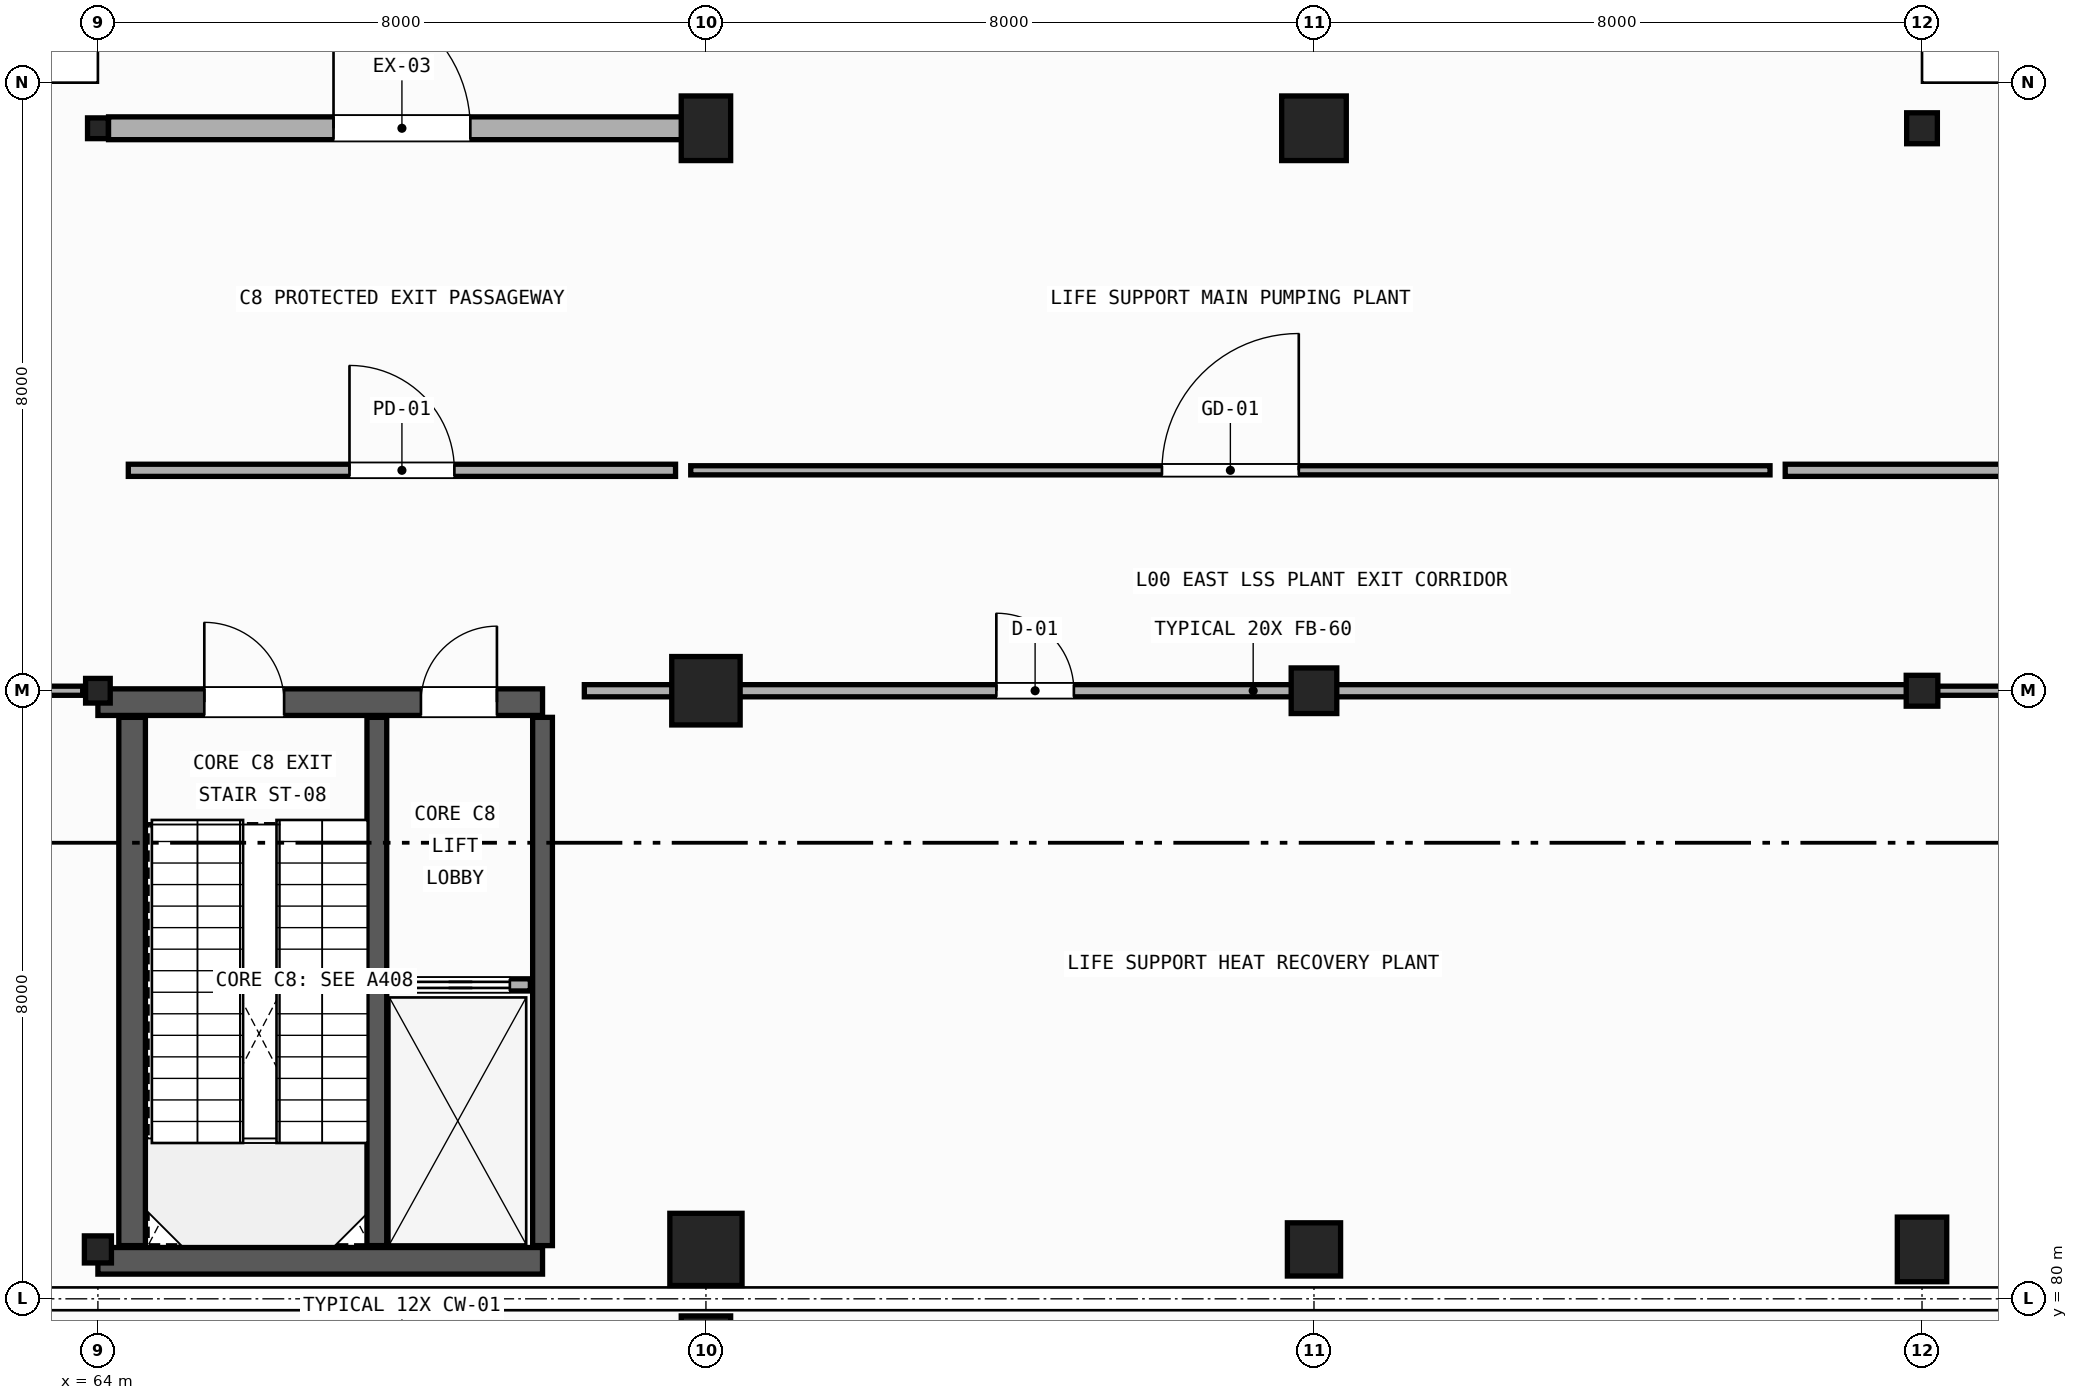
"""IFC4 building model, lengths in metres.
Left out: names, types, materials, properties, quantities, classifications, styles, units other than length and angle.
Written with IfcOpenShell. Run it as: python <this file> out.ifc"""

import sys

from ifc_helpers import new_model, si_unit, direction, frame, frame_2d, origin, origin_2d, place, context, subcontext, project, spatial, rectangle, circle, hollow_circle, i_section, extrude, element, fill, save


model = new_model("IFC4")
c1 = context("Model", 3, precision=1e-05, world=origin(), true_north=direction((0.0, 1.0)))
c2 = subcontext(c1, "Body", "Model", "MODEL_VIEW")
j1 = project(units=[si_unit("LENGTHUNIT", "METRE"), si_unit("PLANEANGLEUNIT", "RADIAN")], contexts=[c1])
p1 = place(None, origin())
s1 = spatial("IfcSite", under=j1, at=p1, CompositionType="ELEMENT")
p2 = place(p1, origin())
s2 = spatial("IfcBuilding", under=s1, at=p2, CompositionType="ELEMENT")
p3 = place(p2, origin())
s3 = spatial("IfcBuildingStorey", under=s2, at=p3, CompositionType="ELEMENT", Elevation=0.0)
p4 = place(p3, frame((72.0, 79.35, 0.0), z_axis=(0.0, 0.0, 1.0), x_axis=(1.0, 0.0, 0.0)))
e1 = element("IfcColumn", 1, at=p4, inside=s3, PredefinedType="PILASTER", context=c2, shape_type="SweptSolid", body=[
    extrude(rectangle(XDim=0.65, YDim=0.85, at=origin_2d()), origin(), (0.0, 0.0, 1.0), 5.08),
])
p5 = place(p3, frame((64.0, 80.65, 0.0), z_axis=(0.0, 0.0, 1.0), x_axis=(0.0, 1.0, 0.0)))
e2 = element("IfcColumn", 2, at=p5, inside=s3, PredefinedType="COLUMN", context=c2, shape_type="SweptSolid", body=[
    extrude(hollow_circle(Radius=0.178, WallThickness=0.012, at=origin_2d()), origin(), (0.0, 0.0, 1.0), 5.08),
])
p6 = place(p3, frame((64.0, 88.0, 0.0), z_axis=(0.0, 0.0, 1.0), x_axis=(1.0, 0.0, 0.0)))
e3 = element("IfcColumn", 3, at=p6, inside=s3, PredefinedType="COLUMN", context=c2, shape_type="SweptSolid", body=[
    extrude(hollow_circle(Radius=0.162, WallThickness=0.012, at=origin_2d()), origin(), (0.0, 0.0, 1.0), 5.08),
])
p7 = place(p3, frame((64.0, 95.4, 0.0), z_axis=(0.0, 0.0, 1.0), x_axis=(0.0, 1.0, 0.0)))
e4 = element("IfcColumn", 4, at=p7, inside=s3, PredefinedType="COLUMN", context=c2, shape_type="SweptSolid", body=[
    extrude(hollow_circle(Radius=0.136, WallThickness=0.012, at=origin_2d()), origin(), (0.0, 0.0, 1.0), 5.08),
])
p8 = place(p3, frame((72.0, 80.65, 0.0), z_axis=(0.0, 0.0, 1.0), x_axis=(1.0, 0.0, 0.0)))
e5 = element("IfcColumn", 5, at=p8, inside=s3, PredefinedType="COLUMN", context=c2, shape_type="SweptSolid", body=[
    extrude(rectangle(XDim=0.95, YDim=0.95, at=origin_2d()), origin(), (0.0, 0.0, 1.0), 5.08),
])
p9 = place(p3, frame((72.0, 88.0, 0.0), z_axis=(0.0, 0.0, 1.0), x_axis=(0.0, 1.0, 0.0)))
e6 = element("IfcColumn", 6, at=p9, inside=s3, PredefinedType="COLUMN", context=c2, shape_type="SweptSolid", body=[
    extrude(rectangle(XDim=0.9, YDim=0.9, at=origin_2d()), origin(), (0.0, 0.0, 1.0), 5.08),
])
p10 = place(p3, frame((72.0, 95.4, 0.0), z_axis=(0.0, 0.0, 1.0), x_axis=(1.0, 0.0, 0.0)))
e7 = element("IfcColumn", 7, at=p10, inside=s3, PredefinedType="PILASTER", context=c2, shape_type="SweptSolid", body=[
    extrude(rectangle(XDim=0.65, YDim=0.85, at=origin_2d()), origin(), (0.0, 0.0, 1.0), 5.08),
])
p11 = place(p3, frame((80.0, 80.65, 0.0), z_axis=(0.0, 0.0, 1.0), x_axis=(0.0, 1.0, 0.0)))
e8 = element("IfcColumn", 8, at=p11, inside=s3, PredefinedType="COLUMN", context=c2, shape_type="SweptSolid", body=[
    extrude(rectangle(XDim=0.7, YDim=0.7, at=origin_2d()), origin(), (0.0, 0.0, 1.0), 5.08),
])
p12 = place(p3, frame((80.0, 88.0, 0.0), z_axis=(0.0, 0.0, 1.0), x_axis=(1.0, 0.0, 0.0)))
e9 = element("IfcColumn", 9, at=p12, inside=s3, PredefinedType="COLUMN", context=c2, shape_type="SweptSolid", body=[
    extrude(rectangle(XDim=0.6, YDim=0.6, at=origin_2d()), origin(), (0.0, 0.0, 1.0), 5.08),
])
p13 = place(p3, frame((80.0, 95.4, 0.0), z_axis=(0.0, 0.0, 1.0), x_axis=(0.0, 1.0, 0.0)))
e10 = element("IfcColumn", 10, at=p13, inside=s3, PredefinedType="COLUMN", context=c2, shape_type="SweptSolid", body=[
    extrude(circle(Radius=0.425, at=origin_2d()), origin(), (0.0, 0.0, 1.0), 5.08),
])
p14 = place(p3, frame((88.0, 80.65, 0.0), z_axis=(0.0, 0.0, 1.0), x_axis=(1.0, 0.0, 0.0)))
e11 = element("IfcColumn", 11, at=p14, inside=s3, PredefinedType="PILASTER", context=c2, shape_type="SweptSolid", body=[
    extrude(rectangle(XDim=0.65, YDim=0.85, at=origin_2d()), origin(), (0.0, 0.0, 1.0), 5.08),
])
p15 = place(p3, frame((88.0, 88.0, 0.0), z_axis=(0.0, 0.0, 1.0), x_axis=(0.0, 1.0, 0.0)))
e12 = element("IfcColumn", 12, at=p15, inside=s3, PredefinedType="COLUMN", context=c2, shape_type="SweptSolid", body=[
    extrude(i_section(OverallWidth=0.406, OverallDepth=0.416, WebThickness=0.03, FlangeThickness=0.048, FilletRadius=0.015, at=origin_2d()), origin(), (0.0, 0.0, 1.0), 5.08),
])
p16 = place(p3, frame((88.0, 95.4, 0.0), z_axis=(0.0, 0.0, 1.0), x_axis=(1.0, 0.0, 0.0)))
e13 = element("IfcColumn", 13, at=p16, inside=s3, PredefinedType="COLUMN", context=c2, shape_type="SweptSolid", body=[
    extrude(i_section(OverallWidth=0.404, OverallDepth=0.407, WebThickness=0.027, FlangeThickness=0.044, FilletRadius=0.015, at=origin_2d()), origin(), (0.0, 0.0, 1.0), 5.08),
])
p17 = place(p3, frame((64.14, 95.4, 0.0), z_axis=(0.0, 0.0, 1.0), x_axis=(1.0, 0.0, 0.0)))
e14 = element("IfcWall", 14, at=p17, inside=s3, PredefinedType="STANDARD", context=c2, shape_type="SweptSolid", body=[
    extrude(rectangle(XDim=7.72, YDim=0.3, at=frame_2d((3.86, 0.0))), origin(), (0.0, 0.0, 1.0), 4.24),
])
p18 = place(p17, frame((2.96, 0.0, 0.0)))
e15 = element("IfcOpeningElement", 15, at=p18, cuts=e14, PredefinedType="OPENING", context=c2, shape_type="SweptSolid", body=[
    extrude(rectangle(XDim=1.8, YDim=2.35, at=frame_2d((0.9, 1.175))), frame((0.0, 0.16, 0.0), z_axis=(0.0, -1.0, 0.0), x_axis=(1.0, 0.0, 0.0)), (0.0, 0.0, 1.0), 0.32),
])
p19 = place(p3, frame((64.0, 87.85, 0.0), z_axis=(0.0, 0.0, 1.0), x_axis=(1.0, 0.0, 0.0)))
e16 = element("IfcWall", 16, at=p19, inside=s3, PredefinedType="SHEAR", context=c2, shape_type="SweptSolid", body=[
    extrude(rectangle(XDim=5.85, YDim=0.35, at=frame_2d((2.925, 0.0))), origin(), (0.0, 0.0, 1.0), 5.07),
])
p20 = place(p19, frame((1.4, 0.0, 0.0)))
e17 = element("IfcOpeningElement", 17, at=p20, cuts=e16, PredefinedType="OPENING", context=c2, shape_type="SweptSolid", body=[
    extrude(rectangle(XDim=1.05, YDim=2.1, at=frame_2d((0.525, 1.05))), frame((0.0, 0.185, 0.0), z_axis=(0.0, -1.0, 0.0), x_axis=(1.0, 0.0, 0.0)), (0.0, 0.0, 1.0), 0.37),
])
p21 = place(p19, frame((4.25, 0.0, 0.0)))
e18 = element("IfcOpeningElement", 18, at=p21, cuts=e16, PredefinedType="OPENING", context=c2, shape_type="SweptSolid", body=[
    extrude(rectangle(XDim=1.0, YDim=2.15, at=frame_2d((0.5, 1.075))), frame((0.0, 0.185, 0.0), z_axis=(0.0, -1.0, 0.0), x_axis=(1.0, 0.0, 0.0)), (0.0, 0.0, 1.0), 0.37),
])
p22 = place(p3, frame((64.0, 80.5, 0.0), z_axis=(0.0, 0.0, 1.0), x_axis=(1.0, 0.0, 0.0)))
e19 = element("IfcWall", 19, at=p22, inside=s3, PredefinedType="SHEAR", context=c2, shape_type="SweptSolid", body=[
    extrude(rectangle(XDim=5.85, YDim=0.35, at=frame_2d((2.925, 0.0))), origin(), (0.0, 0.0, 1.0), 5.07),
])
p23 = place(p3, frame((64.45, 80.7, 0.0), z_axis=(0.0, 0.0, 1.0), x_axis=(0.0, 1.0, 0.0)))
e20 = element("IfcWall", 20, at=p23, inside=s3, PredefinedType="SHEAR", context=c2, shape_type="SweptSolid", body=[
    extrude(rectangle(XDim=6.95, YDim=0.35, at=frame_2d((3.475, 0.0))), origin(), (0.0, 0.0, 1.0), 5.07),
])
for number, where, z_axis, x_axis in (
    (21, (69.85, 80.7, 0.0), (0.0, 0.0, 1.0), (0.0, 1.0, 0.0)),
    (22, (67.67, 80.7, 0.0), (0.0, 0.0, 1.0), (0.0, 1.0, 0.0)),
):
    element("IfcWall", number, at=place(p3, frame(where, z_axis=z_axis, x_axis=x_axis)), inside=s3, PredefinedType="SHEAR", context=c2, shape_type="SweptSolid", body=[
        extrude(rectangle(XDim=6.95, YDim=0.26, at=frame_2d((3.475, 0.0))), origin(), (0.0, 0.0, 1.0), 5.07),
    ])
p24 = place(p3, frame((67.85, 84.13, 0.0), z_axis=(0.0, 0.0, 1.0), x_axis=(1.0, 0.0, 0.0)))
e23 = element("IfcWall", 23, at=p24, inside=s3, PredefinedType="PARTITIONING", context=c2, shape_type="SweptSolid", body=[
    extrude(rectangle(XDim=1.84, YDim=0.16, at=frame_2d((0.92, 0.0))), origin(), (0.0, 0.0, 1.0), 3.6),
])
p25 = place(p24, frame((0.27, 0.0, 0.0)))
e24 = element("IfcOpeningElement", 24, at=p25, cuts=e23, PredefinedType="OPENING", context=c2, shape_type="SweptSolid", body=[
    extrude(rectangle(XDim=1.3, YDim=2.2, at=frame_2d((0.65, 1.1))), frame((0.0, 0.09, 0.0), z_axis=(0.0, -1.0, 0.0), x_axis=(1.0, 0.0, 0.0)), (0.0, 0.0, 1.0), 0.18),
])
p26 = place(p3, frame((57.0, 88.0, 0.0), z_axis=(0.0, 0.0, 1.0), x_axis=(1.0, 0.0, 0.0)))
e25 = element("IfcWall", 25, at=p26, inside=s3, PredefinedType="PARTITIONING", context=c2, shape_type="SweptSolid", body=[
    extrude(rectangle(XDim=6.8, YDim=0.12, at=frame_2d((3.4, 0.0))), origin(), (0.0, 0.0, 1.0), 4.29),
])
p27 = place(p26, frame((2.84, 0.0, 0.0)))
e26 = element("IfcOpeningElement", 26, at=p27, cuts=e25, PredefinedType="OPENING", context=c2, shape_type="SweptSolid", body=[
    extrude(rectangle(XDim=1.12, YDim=2.15, at=frame_2d((0.56, 1.075))), frame((0.0, 0.07, 0.0), z_axis=(0.0, -1.0, 0.0), x_axis=(1.0, 0.0, 0.0)), (0.0, 0.0, 1.0), 0.14),
])
p28 = place(p3, frame((70.4, 88.0, 0.0), z_axis=(0.0, 0.0, 1.0), x_axis=(1.0, 0.0, 0.0)))
e27 = element("IfcWall", 27, at=p28, inside=s3, PredefinedType="PARTITIONING", context=c2, shape_type="SweptSolid", body=[
    extrude(rectangle(XDim=17.6, YDim=0.16, at=frame_2d((8.8, 0.0))), origin(), (0.0, 0.0, 1.0), 4.278),
])
p29 = place(p28, frame((5.421, 0.0, 0.0)))
e28 = element("IfcOpeningElement", 28, at=p29, cuts=e27, PredefinedType="OPENING", context=c2, shape_type="SweptSolid", body=[
    extrude(rectangle(XDim=1.02, YDim=2.15, at=frame_2d((0.51, 1.075))), frame((0.0, 0.09, 0.0), z_axis=(0.0, -1.0, 0.0), x_axis=(1.0, 0.0, 0.0)), (0.0, 0.0, 1.0), 0.18),
])
p30 = place(p3, frame((88.2, 88.0, 0.0), z_axis=(0.0, 0.0, 1.0), x_axis=(1.0, 0.0, 0.0)))
e29 = element("IfcWall", 29, at=p30, inside=s3, PredefinedType="PARTITIONING", context=c2, shape_type="SweptSolid", body=[
    extrude(rectangle(XDim=15.0, YDim=0.12, at=frame_2d((7.5, 0.0))), origin(), (0.0, 0.0, 1.0), 4.278),
])
p31 = place(p30, frame((4.608, 0.0, 0.0)))
e30 = element("IfcOpeningElement", 30, at=p31, cuts=e29, PredefinedType="OPENING", context=c2, shape_type="SweptSolid", body=[
    extrude(rectangle(XDim=0.96, YDim=2.1, at=frame_2d((0.48, 1.05))), frame((0.0, 0.07, 0.0), z_axis=(0.0, -1.0, 0.0), x_axis=(1.0, 0.0, 0.0)), (0.0, 0.0, 1.0), 0.14),
])
p32 = place(p3, frame((64.4, 90.9, 0.0), z_axis=(0.0, 0.0, 1.0), x_axis=(1.0, 0.0, 0.0)))
e31 = element("IfcWall", 31, at=p32, inside=s3, PredefinedType="PARTITIONING", context=c2, shape_type="SweptSolid", body=[
    extrude(rectangle(XDim=7.2, YDim=0.16, at=frame_2d((3.6, 0.0))), origin(), (0.0, 0.0, 1.0), 4.29),
])
p33 = place(p32, frame((2.91, 0.0, 0.0)))
e32 = element("IfcOpeningElement", 32, at=p33, cuts=e31, PredefinedType="OPENING", context=c2, shape_type="SweptSolid", body=[
    extrude(rectangle(XDim=1.38, YDim=2.25, at=frame_2d((0.69, 1.125))), frame((0.0, 0.09, 0.0), z_axis=(0.0, -1.0, 0.0), x_axis=(1.0, 0.0, 0.0)), (0.0, 0.0, 1.0), 0.18),
])
p34 = place(p3, frame((71.8, 90.9, 0.0), z_axis=(0.0, 0.0, 1.0), x_axis=(1.0, 0.0, 0.0)))
e33 = element("IfcWall", 33, at=p34, inside=s3, PredefinedType="PARTITIONING", context=c2, shape_type="SweptSolid", body=[
    extrude(rectangle(XDim=14.2, YDim=0.12, at=frame_2d((7.1, 0.0))), origin(), (0.0, 0.0, 1.0), 4.278),
])
p35 = place(p34, frame((6.2, 0.0, 0.0)))
e34 = element("IfcOpeningElement", 34, at=p35, cuts=e33, PredefinedType="OPENING", context=c2, shape_type="SweptSolid", body=[
    extrude(rectangle(XDim=1.8, YDim=2.4, at=frame_2d((0.9, 1.2))), frame((0.0, 0.07, 0.0), z_axis=(0.0, -1.0, 0.0), x_axis=(1.0, 0.0, 0.0)), (0.0, 0.0, 1.0), 0.14),
])
p36 = place(p3, frame((86.2, 90.9, 0.0), z_axis=(0.0, 0.0, 1.0), x_axis=(1.0, 0.0, 0.0)))
e35 = element("IfcWall", 35, at=p36, inside=s3, PredefinedType="PARTITIONING", context=c2, shape_type="SweptSolid", body=[
    extrude(rectangle(XDim=17.0, YDim=0.16, at=frame_2d((8.5, 0.0))), origin(), (0.0, 0.0, 1.0), 4.287),
])
p37 = place(p36, frame((7.675, 0.0, 0.0)))
e36 = element("IfcOpeningElement", 36, at=p37, cuts=e35, PredefinedType="OPENING", context=c2, shape_type="SweptSolid", body=[
    extrude(rectangle(XDim=1.65, YDim=2.35, at=frame_2d((0.825, 1.175))), frame((0.0, 0.09, 0.0), z_axis=(0.0, -1.0, 0.0), x_axis=(1.0, 0.0, 0.0)), (0.0, 0.0, 1.0), 0.18),
])
p38 = place(p18, origin())
e37 = element("IfcDoor", 37, at=p38, inside=s3, OperationType="SINGLE_SWING_LEFT", PredefinedType="DOOR", context=c2, shape_type="SweptSolid", body=[
    extrude(rectangle(XDim=1.8, YDim=2.35, at=frame_2d((0.9, 1.175))), frame((0.0, 0.025, 0.0), z_axis=(0.0, -1.0, 0.0), x_axis=(1.0, 0.0, 0.0)), (0.0, 0.0, 1.0), 0.05),
])
fill(e15, e37)
p39 = place(p25, origin())
e38 = element("IfcDoor", 38, at=p39, inside=s3, OperationType="SLIDING_TO_LEFT", PredefinedType="DOOR", context=c2, shape_type="SweptSolid", body=[
    extrude(rectangle(XDim=1.3, YDim=2.2, at=frame_2d((0.65, 1.1))), frame((0.0, 0.025, 0.0), z_axis=(0.0, -1.0, 0.0), x_axis=(1.0, 0.0, 0.0)), (0.0, 0.0, 1.0), 0.05),
])
fill(e24, e38)
p40 = place(p20, origin())
e39 = element("IfcDoor", 39, at=p40, inside=s3, OperationType="SINGLE_SWING_LEFT", PredefinedType="DOOR", context=c2, shape_type="SweptSolid", body=[
    extrude(rectangle(XDim=1.05, YDim=2.1, at=frame_2d((0.525, 1.05))), frame((0.0, 0.025, 0.0), z_axis=(0.0, -1.0, 0.0), x_axis=(1.0, 0.0, 0.0)), (0.0, 0.0, 1.0), 0.05),
])
fill(e17, e39)
p41 = place(p21, origin())
e40 = element("IfcDoor", 40, at=p41, inside=s3, OperationType="SINGLE_SWING_RIGHT", PredefinedType="DOOR", context=c2, shape_type="SweptSolid", body=[
    extrude(rectangle(XDim=1.0, YDim=2.15, at=frame_2d((0.5, 1.075))), frame((0.0, 0.025, 0.0), z_axis=(0.0, -1.0, 0.0), x_axis=(1.0, 0.0, 0.0)), (0.0, 0.0, 1.0), 0.05),
])
fill(e18, e40)
p42 = place(p29, origin())
e41 = element("IfcDoor", 41, at=p42, inside=s3, OperationType="SINGLE_SWING_LEFT", PredefinedType="DOOR", context=c2, shape_type="SweptSolid", body=[
    extrude(rectangle(XDim=1.02, YDim=2.15, at=frame_2d((0.51, 1.075))), frame((0.0, 0.025, 0.0), z_axis=(0.0, -1.0, 0.0), x_axis=(1.0, 0.0, 0.0)), (0.0, 0.0, 1.0), 0.05),
])
fill(e28, e41)
p43 = place(p33, origin())
e42 = element("IfcDoor", 42, at=p43, inside=s3, OperationType="SINGLE_SWING_LEFT", PredefinedType="DOOR", context=c2, shape_type="SweptSolid", body=[
    extrude(rectangle(XDim=1.38, YDim=2.25, at=frame_2d((0.69, 1.125))), frame((0.0, 0.025, 0.0), z_axis=(0.0, -1.0, 0.0), x_axis=(1.0, 0.0, 0.0)), (0.0, 0.0, 1.0), 0.05),
])
fill(e32, e42)
p44 = place(p35, origin())
e43 = element("IfcDoor", 43, at=p44, inside=s3, OperationType="SINGLE_SWING_RIGHT", PredefinedType="DOOR", context=c2, shape_type="SweptSolid", body=[
    extrude(rectangle(XDim=1.8, YDim=2.4, at=frame_2d((0.9, 1.2))), frame((0.0, 0.025, 0.0), z_axis=(0.0, -1.0, 0.0), x_axis=(1.0, 0.0, 0.0)), (0.0, 0.0, 1.0), 0.05),
])
fill(e34, e43)
save(model, sys.argv[1])
